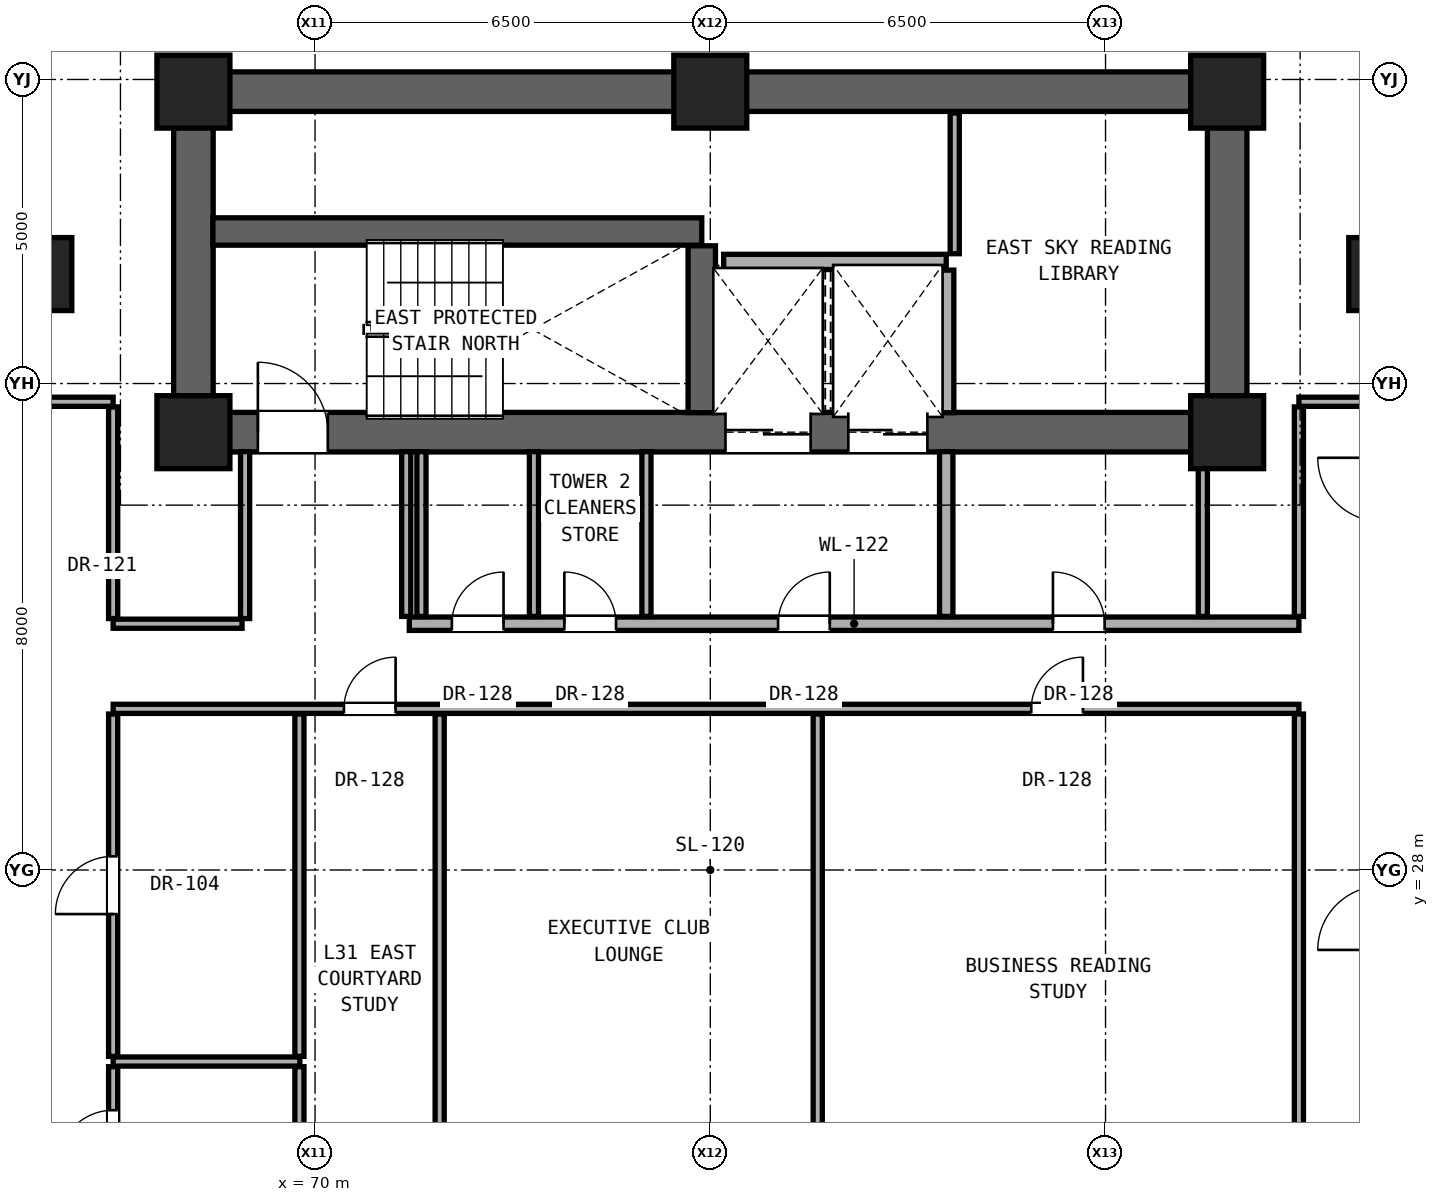
"""IFC4 building model, lengths in metres.
Left out: names, types, materials, properties, quantities, classifications, styles, units other than length and angle.
Written with IfcOpenShell. Run it as: python <this file> out.ifc"""

import sys

from ifc_helpers import new_model, si_unit, direction, frame, frame_2d, origin, origin_2d, place, context, subcontext, project, spatial, rectangle, extrude, element, fill, save


model = new_model("IFC4")
c1 = context("Model", 3, precision=1e-05, world=origin(), true_north=direction((0.0, 1.0)))
c2 = subcontext(c1, "Body", "Model", "MODEL_VIEW")
j1 = project(units=[si_unit("LENGTHUNIT", "METRE"), si_unit("PLANEANGLEUNIT", "RADIAN")], contexts=[c1])
p1 = place(None, origin())
s1 = spatial("IfcSite", under=j1, at=p1, CompositionType="ELEMENT")
p2 = place(p1, origin())
s2 = spatial("IfcBuilding", under=s1, at=p2, CompositionType="ELEMENT")
p3 = place(p2, frame((0.0, 0.0, 111.5)))
s3 = spatial("IfcBuildingStorey", under=s2, at=p3, CompositionType="ELEMENT", Elevation=111.5)
for number, where, z_axis, x_axis in (
    (1, (68.0, 35.2, 0.0), (0.0, 0.0, 1.0), (1.0, 0.0, 0.0)),
    (2, (85.0, 35.2, 0.0), (0.0, 0.0, 1.0), (1.0, 0.0, 0.0)),
    (3, (68.0, 40.8, 0.0), (0.0, 0.0, 1.0), (1.0, 0.0, 0.0)),
    (4, (76.5, 40.8, 0.0), (0.0, 0.0, 1.0), (1.0, 0.0, 0.0)),
    (5, (85.0, 40.8, 0.0), (0.0, 0.0, 1.0), (1.0, 0.0, 0.0)),
):
    element("IfcColumn", number, at=place(p3, frame(where, z_axis=z_axis, x_axis=x_axis)), inside=s3, PredefinedType="COLUMN", context=c2, shape_type="SweptSolid", body=[
        extrude(rectangle(XDim=1.2, YDim=1.2, at=origin_2d()), origin(), (0.0, 0.0, 1.0), 3.3),
    ])
for number, where, z_axis, x_axis in (
    (6, (65.6, 37.8, 0.0), (0.0, 0.0, 1.0), (1.0, 0.0, 0.0)),
    (7, (87.4, 37.8, 0.0), (0.0, 0.0, 1.0), (1.0, 0.0, 0.0)),
):
    element("IfcColumn", number, at=place(p3, frame(where, z_axis=z_axis, x_axis=x_axis)), inside=s3, PredefinedType="PILASTER", context=c2, shape_type="SweptSolid", body=[
        extrude(rectangle(XDim=0.8, YDim=1.2, at=origin_2d()), origin(), (0.0, 0.0, 1.0), 3.3),
    ])
p4 = place(p3, frame((68.0, 40.8, 0.0), z_axis=(0.0, 0.0, 1.0), x_axis=(1.0, 0.0, 0.0)))
e8 = element("IfcWall", 8, at=p4, inside=s3, PredefinedType="SHEAR", context=c2, shape_type="SweptSolid", body=[
    extrude(rectangle(XDim=17.0, YDim=0.65, at=frame_2d((8.5, 0.0))), origin(), (0.0, 0.0, 1.0), 3.08),
])
for number, where, z_axis, x_axis in (
    (9, (68.0, 35.2, 0.0), (0.0, 0.0, 1.0), (0.0, 1.0, 0.0)),
    (10, (85.0, 35.2, 0.0), (0.0, 0.0, 1.0), (0.0, 1.0, 0.0)),
):
    element("IfcWall", number, at=place(p3, frame(where, z_axis=z_axis, x_axis=x_axis)), inside=s3, PredefinedType="SHEAR", context=c2, shape_type="SweptSolid", body=[
        extrude(rectangle(XDim=5.6, YDim=0.65, at=frame_2d((2.8, 0.0))), origin(), (0.0, 0.0, 1.0), 3.08),
    ])
p5 = place(p3, frame((68.0, 35.2, 0.0), z_axis=(0.0, 0.0, 1.0), x_axis=(1.0, 0.0, 0.0)))
e11 = element("IfcWall", 11, at=p5, inside=s3, PredefinedType="SHEAR", context=c2, shape_type="SweptSolid", body=[
    extrude(rectangle(XDim=17.0, YDim=0.65, at=frame_2d((8.5, 0.0))), origin(), (0.0, 0.0, 1.0), 3.08),
])
p6 = place(p5, frame((1.06, 0.0, 0.0)))
e12 = element("IfcOpeningElement", 12, at=p6, cuts=e11, PredefinedType="OPENING", context=c2, shape_type="SweptSolid", body=[
    extrude(rectangle(XDim=1.15, YDim=2.2, at=frame_2d((0.575, 1.1))), frame((0.0, 0.335, 0.0), z_axis=(0.0, -1.0, 0.0), x_axis=(1.0, 0.0, 0.0)), (0.0, 0.0, 1.0), 0.67),
])
p7 = place(p5, frame((8.75, 0.0, 0.0)))
e13 = element("IfcOpeningElement", 13, at=p7, cuts=e11, PredefinedType="OPENING", context=c2, shape_type="SweptSolid", body=[
    extrude(rectangle(XDim=1.4, YDim=2.35, at=frame_2d((0.7, 1.175))), frame((0.0, 0.335, 0.0), z_axis=(0.0, -1.0, 0.0), x_axis=(1.0, 0.0, 0.0)), (0.0, 0.0, 1.0), 0.67),
])
p8 = place(p5, frame((10.77, 0.0, 0.0)))
e14 = element("IfcOpeningElement", 14, at=p8, cuts=e11, PredefinedType="OPENING", context=c2, shape_type="SweptSolid", body=[
    extrude(rectangle(XDim=1.3, YDim=2.3, at=frame_2d((0.65, 1.15))), frame((0.0, 0.335, 0.0), z_axis=(0.0, -1.0, 0.0), x_axis=(1.0, 0.0, 0.0)), (0.0, 0.0, 1.0), 0.67),
])
p9 = place(p3, frame((66.68, 24.85, 0.0), z_axis=(0.0, 0.0, 1.0), x_axis=(1.0, 0.0, 0.0)))
e15 = element("IfcWall", 15, at=p9, inside=s3, PredefinedType="PARTITIONING", context=c2, shape_type="SweptSolid", body=[
    extrude(rectangle(XDim=3.07, YDim=0.15, at=frame_2d((1.535, 0.0))), origin(), (0.0, 0.0, 1.0), 2.145),
])
p10 = place(p3, frame((66.68, 30.65, 0.0), z_axis=(0.0, 0.0, 1.0), x_axis=(1.0, 0.0, 0.0)))
e16 = element("IfcWall", 16, at=p10, inside=s3, PredefinedType="PARTITIONING", context=c2, shape_type="SweptSolid", body=[
    extrude(rectangle(XDim=19.5, YDim=0.15, at=frame_2d((9.75, 0.0))), origin(), (0.0, 0.0, 1.0), 2.145),
])
p11 = place(p10, frame((3.795, 0.0, 0.0)))
e17 = element("IfcOpeningElement", 17, at=p11, cuts=e16, PredefinedType="OPENING", context=c2, shape_type="SweptSolid", body=[
    extrude(rectangle(XDim=0.85, YDim=2.01, at=frame_2d((0.425, 1.005))), frame((0.0, 0.085, 0.0), z_axis=(0.0, -1.0, 0.0), x_axis=(1.0, 0.0, 0.0)), (0.0, 0.0, 1.0), 0.17),
])
p12 = place(p10, frame((15.098, 0.0, 0.0)))
e18 = element("IfcOpeningElement", 18, at=p12, cuts=e16, PredefinedType="OPENING", context=c2, shape_type="SweptSolid", body=[
    extrude(rectangle(XDim=0.85, YDim=2.01, at=frame_2d((0.425, 1.005))), frame((0.0, 0.085, 0.0), z_axis=(0.0, -1.0, 0.0), x_axis=(1.0, 0.0, 0.0)), (0.0, 0.0, 1.0), 0.17),
])
p13 = place(p3, frame((66.68, 32.05, 0.0), z_axis=(0.0, 0.0, 1.0), x_axis=(1.0, 0.0, 0.0)))
e19 = element("IfcWall", 19, at=p13, inside=s3, PredefinedType="PARTITIONING", context=c2, shape_type="SweptSolid", body=[
    extrude(rectangle(XDim=2.12, YDim=0.15, at=frame_2d((1.06, 0.0))), origin(), (0.0, 0.0, 1.0), 2.145),
])
p14 = place(p3, frame((71.55, 32.05, 0.0), z_axis=(0.0, 0.0, 1.0), x_axis=(1.0, 0.0, 0.0)))
e20 = element("IfcWall", 20, at=p14, inside=s3, PredefinedType="SOLIDWALL", context=c2, shape_type="SweptSolid", body=[
    extrude(rectangle(XDim=14.63, YDim=0.22, at=frame_2d((7.315, 0.0))), origin(), (0.0, 0.0, 1.0), 2.145),
])
p15 = place(p14, frame((6.065, 0.0, 0.0)))
e21 = element("IfcOpeningElement", 21, at=p15, cuts=e20, PredefinedType="OPENING", context=c2, shape_type="SweptSolid", body=[
    extrude(rectangle(XDim=0.85, YDim=2.01, at=frame_2d((0.425, 1.005))), frame((0.0, 0.12, 0.0), z_axis=(0.0, -1.0, 0.0), x_axis=(1.0, 0.0, 0.0)), (0.0, 0.0, 1.0), 0.24),
])
p16 = place(p14, frame((10.585, 0.0, 0.0)))
e22 = element("IfcOpeningElement", 22, at=p16, cuts=e20, PredefinedType="OPENING", context=c2, shape_type="SweptSolid", body=[
    extrude(rectangle(XDim=0.85, YDim=2.01, at=frame_2d((0.425, 1.005))), frame((0.0, 0.12, 0.0), z_axis=(0.0, -1.0, 0.0), x_axis=(1.0, 0.0, 0.0)), (0.0, 0.0, 1.0), 0.24),
])
p17 = place(p14, frame((0.7, 0.0, 0.0)))
e23 = element("IfcOpeningElement", 23, at=p17, cuts=e20, PredefinedType="OPENING", context=c2, shape_type="SweptSolid", body=[
    extrude(rectangle(XDim=0.85, YDim=2.01, at=frame_2d((0.425, 1.005))), frame((0.0, 0.12, 0.0), z_axis=(0.0, -1.0, 0.0), x_axis=(1.0, 0.0, 0.0)), (0.0, 0.0, 1.0), 0.24),
])
p18 = place(p14, frame((2.55, 0.0, 0.0)))
e24 = element("IfcOpeningElement", 24, at=p18, cuts=e20, PredefinedType="OPENING", context=c2, shape_type="SweptSolid", body=[
    extrude(rectangle(XDim=0.85, YDim=2.01, at=frame_2d((0.425, 1.005))), frame((0.0, 0.12, 0.0), z_axis=(0.0, -1.0, 0.0), x_axis=(1.0, 0.0, 0.0)), (0.0, 0.0, 1.0), 0.24),
])
p19 = place(p3, frame((65.32, 35.7, 0.0), z_axis=(0.0, 0.0, 1.0), x_axis=(1.0, 0.0, 0.0)))
e25 = element("IfcWall", 25, at=p19, inside=s3, PredefinedType="PARTITIONING", context=c2, shape_type="SweptSolid", body=[
    extrude(rectangle(XDim=1.36, YDim=0.15, at=frame_2d((0.68, 0.0))), origin(), (0.0, 0.0, 1.0), 3.08),
])
p20 = place(p3, frame((86.18, 35.7, 0.0), z_axis=(0.0, 0.0, 1.0), x_axis=(1.0, 0.0, 0.0)))
e26 = element("IfcWall", 26, at=p20, inside=s3, PredefinedType="PARTITIONING", context=c2, shape_type="SweptSolid", body=[
    extrude(rectangle(XDim=1.36, YDim=0.15, at=frame_2d((0.68, 0.0))), origin(), (0.0, 0.0, 1.0), 3.08),
])
p21 = place(p3, frame((76.72, 38.0, 0.0), z_axis=(0.0, 0.0, 1.0), x_axis=(1.0, 0.0, 0.0)))
e27 = element("IfcWall", 27, at=p21, inside=s3, PredefinedType="SOLIDWALL", context=c2, shape_type="SweptSolid", body=[
    extrude(rectangle(XDim=3.66, YDim=0.25, at=frame_2d((1.83, 0.0))), origin(), (0.0, 0.0, 1.0), 3.08),
])
p22 = place(p3, frame((68.32, 38.5, 0.0), z_axis=(0.0, 0.0, 1.0), x_axis=(1.0, 0.0, 0.0)))
e28 = element("IfcWall", 28, at=p22, inside=s3, PredefinedType="SHEAR", context=c2, shape_type="SweptSolid", body=[
    extrude(rectangle(XDim=8.04, YDim=0.45, at=frame_2d((4.02, 0.0))), origin(), (0.0, 0.0, 1.0), 3.08),
])
p23 = place(p3, frame((66.68, 22.435, 0.0), z_axis=(0.0, 0.0, 1.0), x_axis=(0.0, 1.0, 0.0)))
e29 = element("IfcWall", 29, at=p23, inside=s3, PredefinedType="PARTITIONING", context=c2, shape_type="SweptSolid", body=[
    extrude(rectangle(XDim=2.33, YDim=0.15, at=frame_2d((1.165, 0.0))), origin(), (0.0, 0.0, 1.0), 3.08),
])
p24 = place(p23, frame((0.715, 0.0, 0.0)))
e30 = element("IfcOpeningElement", 30, at=p24, cuts=e29, PredefinedType="OPENING", context=c2, shape_type="SweptSolid", body=[
    extrude(rectangle(XDim=0.9, YDim=2.1, at=frame_2d((0.45, 1.05))), frame((0.0, 0.085, 0.0), z_axis=(0.0, -1.0, 0.0), x_axis=(1.0, 0.0, 0.0)), (0.0, 0.0, 1.0), 0.17),
])
p25 = place(p3, frame((66.68, 24.935, 0.0), z_axis=(0.0, 0.0, 1.0), x_axis=(0.0, 1.0, 0.0)))
e31 = element("IfcWall", 31, at=p25, inside=s3, PredefinedType="PARTITIONING", context=c2, shape_type="SweptSolid", body=[
    extrude(rectangle(XDim=5.63, YDim=0.15, at=frame_2d((2.815, 0.0))), origin(), (0.0, 0.0, 1.0), 2.299),
])
p26 = place(p25, frame((2.34, 0.0, 0.0)))
e32 = element("IfcOpeningElement", 32, at=p26, cuts=e31, PredefinedType="OPENING", context=c2, shape_type="SweptSolid", body=[
    extrude(rectangle(XDim=0.95, YDim=2.15, at=frame_2d((0.475, 1.075))), frame((0.0, 0.085, 0.0), z_axis=(0.0, -1.0, 0.0), x_axis=(1.0, 0.0, 0.0)), (0.0, 0.0, 1.0), 0.17),
])
p27 = place(p3, frame((66.68, 32.135, 0.0), z_axis=(0.0, 0.0, 1.0), x_axis=(0.0, 1.0, 0.0)))
e33 = element("IfcWall", 33, at=p27, inside=s3, PredefinedType="PARTITIONING", context=c2, shape_type="SweptSolid", body=[
    extrude(rectangle(XDim=3.48, YDim=0.15, at=frame_2d((1.74, 0.0))), origin(), (0.0, 0.0, 1.0), 2.472),
])
p28 = place(p3, frame((68.85, 32.135, 0.0), z_axis=(0.0, 0.0, 1.0), x_axis=(0.0, 1.0, 0.0)))
e34 = element("IfcWall", 34, at=p28, inside=s3, PredefinedType="PARTITIONING", context=c2, shape_type="SweptSolid", body=[
    extrude(rectangle(XDim=2.745, YDim=0.15, at=frame_2d((1.373, 0.0))), origin(), (0.0, 0.0, 1.0), 3.08),
])
p29 = place(p3, frame((69.743, 22.435, 0.0), z_axis=(0.0, 0.0, 1.0), x_axis=(0.0, 1.0, 0.0)))
e35 = element("IfcWall", 35, at=p29, inside=s3, PredefinedType="PARTITIONING", context=c2, shape_type="SweptSolid", body=[
    extrude(rectangle(XDim=2.33, YDim=0.15, at=frame_2d((1.165, 0.0))), origin(), (0.0, 0.0, 1.0), 3.08),
])
p30 = place(p3, frame((69.743, 24.935, 0.0), z_axis=(0.0, 0.0, 1.0), x_axis=(0.0, 1.0, 0.0)))
e36 = element("IfcWall", 36, at=p30, inside=s3, PredefinedType="PARTITIONING", context=c2, shape_type="SweptSolid", body=[
    extrude(rectangle(XDim=5.63, YDim=0.15, at=frame_2d((2.815, 0.0))), origin(), (0.0, 0.0, 1.0), 2.145),
])
for number, where, z_axis, x_axis in (
    (37, (71.5, 32.17, 0.0), (0.0, 0.0, 1.0), (0.0, 1.0, 0.0)),
    (38, (71.75, 32.17, 0.0), (0.0, 0.0, 1.0), (0.0, 1.0, 0.0)),
):
    element("IfcWall", number, at=place(p3, frame(where, z_axis=z_axis, x_axis=x_axis)), inside=s3, PredefinedType="PARTITIONING", context=c2, shape_type="SweptSolid", body=[
        extrude(rectangle(XDim=2.71, YDim=0.15, at=frame_2d((1.355, 0.0))), origin(), (0.0, 0.0, 1.0), 3.08),
    ])
p31 = place(p3, frame((72.05, 22.435, 0.0), z_axis=(0.0, 0.0, 1.0), x_axis=(0.0, 1.0, 0.0)))
e39 = element("IfcWall", 39, at=p31, inside=s3, PredefinedType="PARTITIONING", context=c2, shape_type="SweptSolid", body=[
    extrude(rectangle(XDim=8.13, YDim=0.15, at=frame_2d((4.065, 0.0))), origin(), (0.0, 0.0, 1.0), 2.145),
])
for number, where, z_axis, x_axis in (
    (40, (73.6, 32.17, 0.0), (0.0, 0.0, 1.0), (0.0, 1.0, 0.0)),
    (41, (75.45, 32.17, 0.0), (0.0, 0.0, 1.0), (0.0, 1.0, 0.0)),
):
    element("IfcWall", number, at=place(p3, frame(where, z_axis=z_axis, x_axis=x_axis)), inside=s3, PredefinedType="PARTITIONING", context=c2, shape_type="SweptSolid", body=[
        extrude(rectangle(XDim=2.71, YDim=0.15, at=frame_2d((1.355, 0.0))), origin(), (0.0, 0.0, 1.0), 3.08),
    ])
p32 = place(p3, frame((76.36, 35.52, 0.0), z_axis=(0.0, 0.0, 1.0), x_axis=(0.0, 1.0, 0.0)))
e42 = element("IfcWall", 42, at=p32, inside=s3, PredefinedType="SHEAR", context=c2, shape_type="SweptSolid", body=[
    extrude(rectangle(XDim=2.745, YDim=0.45, at=frame_2d((1.373, 0.0))), origin(), (0.0, 0.0, 1.0), 3.08),
])
p33 = place(p3, frame((78.267, 22.435, 0.0), z_axis=(0.0, 0.0, 1.0), x_axis=(0.0, 1.0, 0.0)))
e43 = element("IfcWall", 43, at=p33, inside=s3, PredefinedType="PARTITIONING", context=c2, shape_type="SweptSolid", body=[
    extrude(rectangle(XDim=8.13, YDim=0.15, at=frame_2d((4.065, 0.0))), origin(), (0.0, 0.0, 1.0), 2.145),
])
p34 = place(p3, frame((80.38, 32.17, 0.0), z_axis=(0.0, 0.0, 1.0), x_axis=(0.0, 1.0, 0.0)))
e44 = element("IfcWall", 44, at=p34, inside=s3, PredefinedType="SOLIDWALL", context=c2, shape_type="SweptSolid", body=[
    extrude(rectangle(XDim=2.71, YDim=0.22, at=frame_2d((1.355, 0.0))), origin(), (0.0, 0.0, 1.0), 3.08),
])
p35 = place(p3, frame((80.38, 35.52, 0.0), z_axis=(0.0, 0.0, 1.0), x_axis=(0.0, 1.0, 0.0)))
e45 = element("IfcWall", 45, at=p35, inside=s3, PredefinedType="SOLIDWALL", context=c2, shape_type="SweptSolid", body=[
    extrude(rectangle(XDim=2.345, YDim=0.25, at=frame_2d((1.172, 0.0))), origin(), (0.0, 0.0, 1.0), 3.08),
])
p36 = place(p3, frame((80.52, 38.135, 0.0), z_axis=(0.0, 0.0, 1.0), x_axis=(0.0, 1.0, 0.0)))
e46 = element("IfcWall", 46, at=p36, inside=s3, PredefinedType="PARTITIONING", context=c2, shape_type="SweptSolid", body=[
    extrude(rectangle(XDim=2.315, YDim=0.15, at=frame_2d((1.157, 0.0))), origin(), (0.0, 0.0, 1.0), 3.08),
])
p37 = place(p3, frame((84.6, 32.17, 0.0), z_axis=(0.0, 0.0, 1.0), x_axis=(0.0, 1.0, 0.0)))
e47 = element("IfcWall", 47, at=p37, inside=s3, PredefinedType="PARTITIONING", context=c2, shape_type="SweptSolid", body=[
    extrude(rectangle(XDim=2.71, YDim=0.15, at=frame_2d((1.355, 0.0))), origin(), (0.0, 0.0, 1.0), 3.08),
])
p38 = place(p3, frame((86.18, 22.435, 0.0), z_axis=(0.0, 0.0, 1.0), x_axis=(0.0, 1.0, 0.0)))
e48 = element("IfcWall", 48, at=p38, inside=s3, PredefinedType="PARTITIONING", context=c2, shape_type="SweptSolid", body=[
    extrude(rectangle(XDim=8.13, YDim=0.15, at=frame_2d((4.065, 0.0))), origin(), (0.0, 0.0, 1.0), 2.299),
])
p39 = place(p3, frame((86.18, 32.17, 0.0), z_axis=(0.0, 0.0, 1.0), x_axis=(0.0, 1.0, 0.0)))
e49 = element("IfcWall", 49, at=p39, inside=s3, PredefinedType="PARTITIONING", context=c2, shape_type="SweptSolid", body=[
    extrude(rectangle(XDim=3.445, YDim=0.15, at=frame_2d((1.723, 0.0))), origin(), (0.0, 0.0, 1.0), 2.472),
])
p40 = place(p6, origin())
e50 = element("IfcDoor", 50, at=p40, inside=s3, OperationType="SINGLE_SWING_LEFT", PredefinedType="DOOR", context=c2, shape_type="SweptSolid", body=[
    extrude(rectangle(XDim=1.15, YDim=2.2, at=frame_2d((0.575, 1.1))), frame((0.0, 0.025, 0.0), z_axis=(0.0, -1.0, 0.0), x_axis=(1.0, 0.0, 0.0)), (0.0, 0.0, 1.0), 0.05),
])
fill(e12, e50)
p41 = place(p15, origin())
e51 = element("IfcDoor", 51, at=p41, inside=s3, OperationType="SINGLE_SWING_RIGHT", PredefinedType="DOOR", context=c2, shape_type="SweptSolid", body=[
    extrude(rectangle(XDim=0.85, YDim=2.01, at=frame_2d((0.425, 1.005))), frame((0.0, 0.025, 0.0), z_axis=(0.0, -1.0, 0.0), x_axis=(1.0, 0.0, 0.0)), (0.0, 0.0, 1.0), 0.05),
])
fill(e21, e51)
p42 = place(p16, origin())
e52 = element("IfcDoor", 52, at=p42, inside=s3, OperationType="SINGLE_SWING_LEFT", PredefinedType="DOOR", context=c2, shape_type="SweptSolid", body=[
    extrude(rectangle(XDim=0.85, YDim=2.01, at=frame_2d((0.425, 1.005))), frame((0.0, 0.025, 0.0), z_axis=(0.0, -1.0, 0.0), x_axis=(1.0, 0.0, 0.0)), (0.0, 0.0, 1.0), 0.05),
])
fill(e22, e52)
p43 = place(p17, origin())
e53 = element("IfcDoor", 53, at=p43, inside=s3, OperationType="SINGLE_SWING_RIGHT", PredefinedType="DOOR", context=c2, shape_type="SweptSolid", body=[
    extrude(rectangle(XDim=0.85, YDim=2.01, at=frame_2d((0.425, 1.005))), frame((0.0, 0.025, 0.0), z_axis=(0.0, -1.0, 0.0), x_axis=(1.0, 0.0, 0.0)), (0.0, 0.0, 1.0), 0.05),
])
fill(e23, e53)
p44 = place(p18, origin())
e54 = element("IfcDoor", 54, at=p44, inside=s3, OperationType="SINGLE_SWING_LEFT", PredefinedType="DOOR", context=c2, shape_type="SweptSolid", body=[
    extrude(rectangle(XDim=0.85, YDim=2.01, at=frame_2d((0.425, 1.005))), frame((0.0, 0.025, 0.0), z_axis=(0.0, -1.0, 0.0), x_axis=(1.0, 0.0, 0.0)), (0.0, 0.0, 1.0), 0.05),
])
fill(e24, e54)
p45 = place(p24, origin())
e55 = element("IfcDoor", 55, at=p45, inside=s3, OperationType="SINGLE_SWING_LEFT", PredefinedType="DOOR", context=c2, shape_type="SweptSolid", body=[
    extrude(rectangle(XDim=0.9, YDim=2.1, at=frame_2d((0.45, 1.05))), frame((0.0, 0.025, 0.0), z_axis=(0.0, -1.0, 0.0), x_axis=(1.0, 0.0, 0.0)), (0.0, 0.0, 1.0), 0.05),
])
fill(e30, e55)
p46 = place(p26, origin())
e56 = element("IfcDoor", 56, at=p46, inside=s3, OperationType="SINGLE_SWING_LEFT", PredefinedType="DOOR", context=c2, shape_type="SweptSolid", body=[
    extrude(rectangle(XDim=0.95, YDim=2.15, at=frame_2d((0.475, 1.075))), frame((0.0, 0.025, 0.0), z_axis=(0.0, -1.0, 0.0), x_axis=(1.0, 0.0, 0.0)), (0.0, 0.0, 1.0), 0.05),
])
fill(e32, e56)
p47 = place(p11, origin())
e57 = element("IfcDoor", 57, at=p47, inside=s3, OperationType="SINGLE_SWING_RIGHT", PredefinedType="DOOR", context=c2, shape_type="SweptSolid", body=[
    extrude(rectangle(XDim=0.85, YDim=2.01, at=frame_2d((0.425, 1.005))), frame((0.0, 0.025, 0.0), z_axis=(0.0, -1.0, 0.0), x_axis=(1.0, 0.0, 0.0)), (0.0, 0.0, 1.0), 0.05),
])
fill(e17, e57)
p48 = place(p12, origin())
e58 = element("IfcDoor", 58, at=p48, inside=s3, OperationType="SINGLE_SWING_RIGHT", PredefinedType="DOOR", context=c2, shape_type="SweptSolid", body=[
    extrude(rectangle(XDim=0.85, YDim=2.01, at=frame_2d((0.425, 1.005))), frame((0.0, 0.025, 0.0), z_axis=(0.0, -1.0, 0.0), x_axis=(1.0, 0.0, 0.0)), (0.0, 0.0, 1.0), 0.05),
])
fill(e18, e58)
p49 = place(p7, origin())
e59 = element("IfcDoor", 59, at=p49, inside=s3, OperationType="DOUBLE_DOOR_SLIDING", PredefinedType="DOOR", context=c2, shape_type="SweptSolid", body=[
    extrude(rectangle(XDim=1.4, YDim=2.35, at=frame_2d((0.7, 1.175))), frame((0.0, 0.025, 0.0), z_axis=(0.0, -1.0, 0.0), x_axis=(1.0, 0.0, 0.0)), (0.0, 0.0, 1.0), 0.05),
])
fill(e13, e59)
p50 = place(p8, origin())
e60 = element("IfcDoor", 60, at=p50, inside=s3, OperationType="DOUBLE_DOOR_SLIDING", PredefinedType="DOOR", context=c2, shape_type="SweptSolid", body=[
    extrude(rectangle(XDim=1.3, YDim=2.3, at=frame_2d((0.65, 1.15))), frame((0.0, 0.025, 0.0), z_axis=(0.0, -1.0, 0.0), x_axis=(1.0, 0.0, 0.0)), (0.0, 0.0, 1.0), 0.05),
])
fill(e14, e60)
save(model, sys.argv[1])
